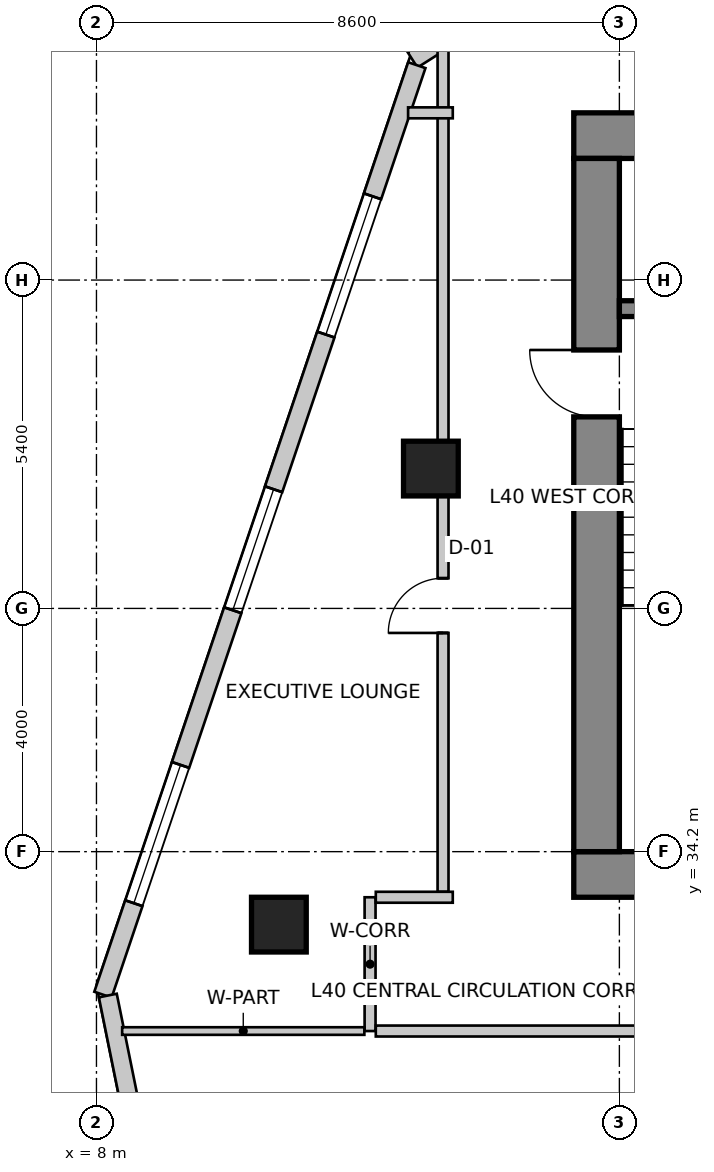
"""IFC4 building model, lengths in metres.
Left out: names, types, materials, properties, quantities, classifications, styles, units other than length and angle.
Written with IfcOpenShell. Run it as: python <this file> out.ifc"""

import sys

from ifc_helpers import new_model, si_unit, direction, frame, frame_2d, origin, origin_2d, place, context, subcontext, project, spatial, rectangle, extrude, source, transform, mapped, element, fill, save


model = new_model("IFC4")
c1 = context("Model", 3, precision=1e-05, world=origin(), true_north=direction((0.0, 1.0)))
c2 = subcontext(c1, "Body", "Model", "MODEL_VIEW")
j1 = project(units=[si_unit("LENGTHUNIT", "METRE"), si_unit("PLANEANGLEUNIT", "RADIAN")], contexts=[c1])
p1 = place(None, origin())
s1 = spatial("IfcSite", under=j1, at=p1, CompositionType="ELEMENT")
p2 = place(p1, origin())
s2 = spatial("IfcBuilding", under=s1, at=p2, CompositionType="ELEMENT")
p3 = place(p2, frame((0.0, 0.0, 161.0)))
s3 = spatial("IfcBuildingStorey", under=s2, at=p3, CompositionType="ELEMENT", Elevation=161.0)
p4 = place(p3, frame((15.85, 45.975, 0.0), z_axis=(0.0, 0.0, 1.0), x_axis=(1.0, 0.0, 0.0)))
e1 = element("IfcWall", 1, at=p4, inside=s3, PredefinedType="SHEAR", context=c2, shape_type="SweptSolid", body=[
    extrude(rectangle(XDim=15.9, YDim=0.75, at=frame_2d((7.95, 0.0))), origin(), (0.0, 0.0, 1.0), 3.6),
])
p5 = place(p3, frame((15.85, 33.825, 0.0), z_axis=(0.0, 0.0, 1.0), x_axis=(1.0, 0.0, 0.0)))
e2 = element("IfcWall", 2, at=p5, inside=s3, PredefinedType="SHEAR", context=c2, shape_type="SweptSolid", body=[
    extrude(rectangle(XDim=15.9, YDim=0.75, at=frame_2d((7.95, 0.0))), origin(), (0.0, 0.0, 1.0), 3.6),
])
m1 = source(origin(), c2, "Body", "SweptSolid", [
    extrude(rectangle(XDim=1.3, YDim=2.15, at=frame_2d((0.65, 1.075))), frame((0.0, 0.385, 0.0), z_axis=(0.0, -1.0, 0.0), x_axis=(1.0, 0.0, 0.0)), (0.0, 0.0, 1.0), 0.77),
])
p6 = place(p5, frame((10.08, 0.0, 0.0)))
e3 = element("IfcOpeningElement", 3, at=p6, cuts=e2, PredefinedType="OPENING", context=c2, shape_type="MappedRepresentation", body=[
    mapped(m1, transform((0.0, 0.0, 0.0), scale=1.0)),
])
p7 = place(p3, frame((16.225, 34.2, 0.0), z_axis=(0.0, 0.0, 1.0), x_axis=(0.0, 1.0, 0.0)))
e4 = element("IfcWall", 4, at=p7, inside=s3, PredefinedType="SHEAR", context=c2, shape_type="SweptSolid", body=[
    extrude(rectangle(XDim=11.4, YDim=0.75, at=frame_2d((5.7, 0.0))), origin(), (0.0, 0.0, 1.0), 3.6),
])
m2 = source(origin(), c2, "Body", "SweptSolid", [
    extrude(rectangle(XDim=1.1, YDim=2.15, at=frame_2d((0.55, 1.075))), frame((0.0, 0.385, 0.0), z_axis=(0.0, -1.0, 0.0), x_axis=(1.0, 0.0, 0.0)), (0.0, 0.0, 1.0), 0.77),
])
p8 = place(p7, frame((7.15, 0.0, 0.0)))
e5 = element("IfcOpeningElement", 5, at=p8, cuts=e4, PredefinedType="OPENING", context=c2, shape_type="MappedRepresentation", body=[
    mapped(m2, transform((0.0, 0.0, 0.0), scale=1.0)),
])
p9 = place(p3, frame((16.6, 43.13, 0.0), z_axis=(0.0, 0.0, 1.0), x_axis=(1.0, 0.0, 0.0)))
e6 = element("IfcWall", 6, at=p9, inside=s3, PredefinedType="SHEAR", context=c2, shape_type="SweptSolid", body=[
    extrude(rectangle(XDim=3.5, YDim=0.26, at=frame_2d((1.75, 0.0))), origin(), (0.0, 0.0, 1.0), 3.6),
])
m3 = source(origin(), c2, "Body", "SweptSolid", [
    extrude(rectangle(XDim=0.9, YDim=0.9, at=origin_2d()), origin(), (0.0, 0.0, 1.0), 3.6),
])
for number, where, z_axis, x_axis in (
    (7, (11.0, 33.0, 0.0), (0.0, 0.0, 1.0), (1.0, 0.0, 0.0)),
    (8, (13.5, 40.5, 0.0), (0.0, 0.0, 1.0), (1.0, 0.0, 0.0)),
):
    element("IfcColumn", number, at=place(p3, frame(where, z_axis=z_axis, x_axis=x_axis)), inside=s3, PredefinedType="COLUMN", context=c2, shape_type="MappedRepresentation", body=[
        mapped(m3, transform((0.0, 0.0, 0.0), scale=1.0)),
    ])
p10 = place(p3, frame((21.875, 52.742, 0.0), z_axis=(0.0, 0.0, 1.0), x_axis=(-0.843662465249, -0.536873956092, 0.0)))
e9 = element("IfcWall", 9, at=p10, inside=s3, PredefinedType="SOLIDWALL", context=c2, shape_type="SweptSolid", body=[
    extrude(rectangle(XDim=10.284, YDim=0.3, at=frame_2d((5.142, 0.0))), origin(), (0.0, 0.0, 1.0), 3.35),
])
m4 = source(origin(), c2, "Body", "SweptSolid", [
    extrude(rectangle(XDim=2.1, YDim=2.0, at=frame_2d((1.05, 1.0))), frame((0.0, 0.16, 0.0), z_axis=(0.0, -1.0, 0.0), x_axis=(1.0, 0.0, 0.0)), (0.0, 0.0, 1.0), 0.32),
])
p11 = place(p10, frame((2.806, 0.0, 0.85)))
e10 = element("IfcOpeningElement", 10, at=p11, cuts=e9, PredefinedType="OPENING", context=c2, shape_type="MappedRepresentation", body=[
    mapped(m4, transform((0.0, 0.0, 0.0), scale=1.0)),
])
m5 = source(origin(), c2, "Body", "SweptSolid", [
    extrude(rectangle(XDim=1.2, YDim=1.6, at=frame_2d((0.6, 0.8))), frame((0.0, 0.16, 0.0), z_axis=(0.0, -1.0, 0.0), x_axis=(1.0, 0.0, 0.0)), (0.0, 0.0, 1.0), 0.32),
])
p12 = place(p10, frame((8.087, 0.0, 0.85)))
e11 = element("IfcOpeningElement", 11, at=p12, cuts=e9, PredefinedType="OPENING", context=c2, shape_type="MappedRepresentation", body=[
    mapped(m5, transform((0.0, 0.0, 0.0), scale=1.0)),
])
p13 = place(p3, frame((13.269, 47.134, 0.0), z_axis=(0.0, 0.0, 1.0), x_axis=(-0.319929773322, -0.947441259468, 0.0)))
e12 = element("IfcWall", 12, at=p13, inside=s3, PredefinedType="SOLIDWALL", context=c2, shape_type="SweptSolid", body=[
    extrude(rectangle(XDim=16.134, YDim=0.3, at=frame_2d((8.067, 0.0))), origin(), (0.0, 0.0, 1.0), 3.35),
])
m6 = source(origin(), c2, "Body", "SweptSolid", [
    extrude(rectangle(XDim=2.4, YDim=2.2, at=frame_2d((1.2, 1.1))), frame((0.0, 0.16, 0.0), z_axis=(0.0, -1.0, 0.0), x_axis=(1.0, 0.0, 0.0)), (0.0, 0.0, 1.0), 0.32),
])
p14 = place(p13, frame((2.276, 0.0, 0.85)))
e13 = element("IfcOpeningElement", 13, at=p14, cuts=e12, PredefinedType="OPENING", context=c2, shape_type="MappedRepresentation", body=[
    mapped(m6, transform((0.0, 0.0, 0.0), scale=1.0)),
])
p15 = place(p13, frame((7.361, 0.0, 0.85)))
e14 = element("IfcOpeningElement", 14, at=p15, cuts=e12, PredefinedType="OPENING", context=c2, shape_type="MappedRepresentation", body=[
    mapped(m4, transform((0.0, 0.0, 0.0), scale=1.0)),
])
p16 = place(p13, frame((12.146, 0.0, 0.85)))
e15 = element("IfcOpeningElement", 15, at=p16, cuts=e12, PredefinedType="OPENING", context=c2, shape_type="MappedRepresentation", body=[
    mapped(m6, transform((0.0, 0.0, 0.0), scale=1.0)),
])
p17 = place(p3, frame((8.187, 31.834, 0.0), z_axis=(0.0, 0.0, 1.0), x_axis=(0.198869838988, -0.980025911464, 0.0)))
e16 = element("IfcWall", 16, at=p17, inside=s3, PredefinedType="SOLIDWALL", context=c2, shape_type="SweptSolid", body=[
    extrude(rectangle(XDim=16.363, YDim=0.3, at=frame_2d((8.182, 0.0))), origin(), (0.0, 0.0, 1.0), 3.35),
])
m7 = source(origin(), c2, "Body", "SweptSolid", [
    extrude(rectangle(XDim=1.6, YDim=2.15, at=frame_2d((0.8, 1.075))), frame((0.0, 0.16, 0.0), z_axis=(0.0, -1.0, 0.0), x_axis=(1.0, 0.0, 0.0)), (0.0, 0.0, 1.0), 0.32),
])
p18 = place(p17, frame((9.459, 0.0, 0.0)))
e17 = element("IfcOpeningElement", 17, at=p18, cuts=e16, PredefinedType="OPENING", context=c2, shape_type="MappedRepresentation", body=[
    mapped(m7, transform((0.0, 0.0, 0.0), scale=1.0)),
])
p19 = place(p17, frame((3.959, 0.0, 0.85)))
e18 = element("IfcOpeningElement", 18, at=p19, cuts=e16, PredefinedType="OPENING", context=c2, shape_type="MappedRepresentation", body=[
    mapped(m4, transform((0.0, 0.0, 0.0), scale=1.0)),
])
p20 = place(p17, frame((13.386, 0.0, 0.85)))
e19 = element("IfcOpeningElement", 19, at=p20, cuts=e16, PredefinedType="OPENING", context=c2, shape_type="MappedRepresentation", body=[
    mapped(m4, transform((0.0, 0.0, 0.0), scale=1.0)),
])
p21 = place(p3, frame((12.5, 31.25, 0.0), z_axis=(0.0, 0.0, 1.0), x_axis=(0.0, 1.0, 0.0)))
e20 = element("IfcWall", 20, at=p21, inside=s3, PredefinedType="PARTITIONING", context=c2, shape_type="SweptSolid", body=[
    extrude(rectangle(XDim=2.2, YDim=0.18, at=frame_2d((1.1, 0.0))), origin(), (0.0, 0.0, 1.0), 3.019),
])
p22 = place(p3, frame((12.594, 33.45, 0.0), z_axis=(0.0, 0.0, 1.0), x_axis=(1.0, 0.0, 0.0)))
e21 = element("IfcWall", 21, at=p22, inside=s3, PredefinedType="PARTITIONING", context=c2, shape_type="SweptSolid", body=[
    extrude(rectangle(XDim=1.266, YDim=0.18, at=frame_2d((0.633, 0.0))), origin(), (0.0, 0.0, 1.0), 3.35),
])
p23 = place(p3, frame((26.76, 31.25, 0.0), z_axis=(0.0, 0.0, 1.0), x_axis=(-1.0, 0.0, 0.0)))
e22 = element("IfcWall", 22, at=p23, inside=s3, PredefinedType="PARTITIONING", context=c2, shape_type="SweptSolid", body=[
    extrude(rectangle(XDim=14.166, YDim=0.18, at=frame_2d((7.083, 0.0))), origin(), (0.0, 0.0, 1.0), 3.019),
])
m8 = source(origin(), c2, "Body", "SweptSolid", [
    extrude(rectangle(XDim=1.4, YDim=2.15, at=frame_2d((0.7, 1.075))), frame((0.0, 0.1, 0.0), z_axis=(0.0, -1.0, 0.0), x_axis=(1.0, 0.0, 0.0)), (0.0, 0.0, 1.0), 0.2),
])
p24 = place(p23, frame((6.323, 0.0, 0.0)))
e23 = element("IfcOpeningElement", 23, at=p24, cuts=e22, PredefinedType="OPENING", context=c2, shape_type="MappedRepresentation", body=[
    mapped(m8, transform((0.0, 0.0, 0.0), scale=1.0)),
])
p25 = place(p3, frame((13.7, 33.544, 0.0), z_axis=(0.0, 0.0, 1.0), x_axis=(0.0, 1.0, 0.0)))
e24 = element("IfcWall", 24, at=p25, inside=s3, PredefinedType="PARTITIONING", context=c2, shape_type="SweptSolid", body=[
    extrude(rectangle(XDim=13.86, YDim=0.18, at=frame_2d((6.93, 0.0))), origin(), (0.0, 0.0, 1.0), 2.492),
])
m9 = source(origin(), c2, "Body", "SweptSolid", [
    extrude(rectangle(XDim=0.9, YDim=2.15, at=frame_2d((0.45, 1.075))), frame((0.0, 0.1, 0.0), z_axis=(0.0, -1.0, 0.0), x_axis=(1.0, 0.0, 0.0)), (0.0, 0.0, 1.0), 0.2),
])
p26 = place(p25, frame((4.253, 0.0, 0.0)))
e25 = element("IfcOpeningElement", 25, at=p26, cuts=e24, PredefinedType="OPENING", context=c2, shape_type="MappedRepresentation", body=[
    mapped(m9, transform((0.0, 0.0, 0.0), scale=1.0)),
])
p27 = place(p3, frame((13.86, 46.35, 0.0), z_axis=(0.0, 0.0, 1.0), x_axis=(-1.0, 0.0, 0.0)))
e26 = element("IfcWall", 26, at=p27, inside=s3, PredefinedType="PARTITIONING", context=c2, shape_type="SweptSolid", body=[
    extrude(rectangle(XDim=0.735, YDim=0.18, at=frame_2d((0.367, 0.0))), origin(), (0.0, 0.0, 1.0), 3.35),
])
p28 = place(p3, frame((12.406, 31.25, 0.0), z_axis=(0.0, 0.0, 1.0), x_axis=(-1.0, 0.0, 0.0)))
e27 = element("IfcWall", 27, at=p28, inside=s3, PredefinedType="PARTITIONING", context=c2, shape_type="SweptSolid", body=[
    extrude(rectangle(XDim=3.983, YDim=0.125, at=frame_2d((1.992, 0.0))), origin(), (0.0, 0.0, 1.0), 2.492),
])
m10 = source(origin(), c2, "Body", "SweptSolid", [
    extrude(rectangle(XDim=2.4, YDim=2.2, at=frame_2d((1.2, 1.1))), frame((0.0, -0.015, 0.0), z_axis=(0.0, -1.0, 0.0), x_axis=(1.0, 0.0, 0.0)), (0.0, 0.0, 1.0), 0.06),
])
p29 = place(p14, origin())
e28 = element("IfcWindow", 28, at=p29, inside=s3, PartitioningType="SINGLE_PANEL", PredefinedType="WINDOW", context=c2, shape_type="MappedRepresentation", body=[
    mapped(m10, transform((0.0, 0.0, 0.0), scale=1.0)),
])
fill(e13, e28)
m11 = source(origin(), c2, "Body", "SweptSolid", [
    extrude(rectangle(XDim=2.1, YDim=2.0, at=frame_2d((1.05, 1.0))), frame((0.0, -0.015, 0.0), z_axis=(0.0, -1.0, 0.0), x_axis=(1.0, 0.0, 0.0)), (0.0, 0.0, 1.0), 0.06),
])
p30 = place(p15, origin())
e29 = element("IfcWindow", 29, at=p30, inside=s3, PartitioningType="SINGLE_PANEL", PredefinedType="WINDOW", context=c2, shape_type="MappedRepresentation", body=[
    mapped(m11, transform((0.0, 0.0, 0.0), scale=1.0)),
])
fill(e14, e29)
p31 = place(p16, origin())
e30 = element("IfcWindow", 30, at=p31, inside=s3, PartitioningType="SINGLE_PANEL", PredefinedType="WINDOW", context=c2, shape_type="MappedRepresentation", body=[
    mapped(m10, transform((0.0, 0.0, 0.0), scale=1.0)),
])
fill(e15, e30)
m12 = source(origin(), c2, "Body", "SweptSolid", [
    extrude(rectangle(XDim=1.1, YDim=2.15, at=frame_2d((0.55, 1.075))), frame((0.0, 0.025, 0.0), z_axis=(0.0, -1.0, 0.0), x_axis=(1.0, 0.0, 0.0)), (0.0, 0.0, 1.0), 0.05),
])
p32 = place(p8, origin())
e31 = element("IfcDoor", 31, at=p32, inside=s3, OperationType="SINGLE_SWING_RIGHT", PredefinedType="DOOR", context=c2, shape_type="MappedRepresentation", body=[
    mapped(m12, transform((0.0, 0.0, 0.0), scale=1.0)),
])
fill(e5, e31)
m13 = source(origin(), c2, "Body", "SweptSolid", [
    extrude(rectangle(XDim=0.9, YDim=2.15, at=frame_2d((0.45, 1.075))), frame((0.0, 0.025, 0.0), z_axis=(0.0, -1.0, 0.0), x_axis=(1.0, 0.0, 0.0)), (0.0, 0.0, 1.0), 0.05),
])
p33 = place(p26, origin())
e32 = element("IfcDoor", 32, at=p33, inside=s3, OperationType="SINGLE_SWING_LEFT", PredefinedType="DOOR", context=c2, shape_type="MappedRepresentation", body=[
    mapped(m13, transform((0.0, 0.0, 0.0), scale=1.0)),
])
fill(e25, e32)
save(model, sys.argv[1])
